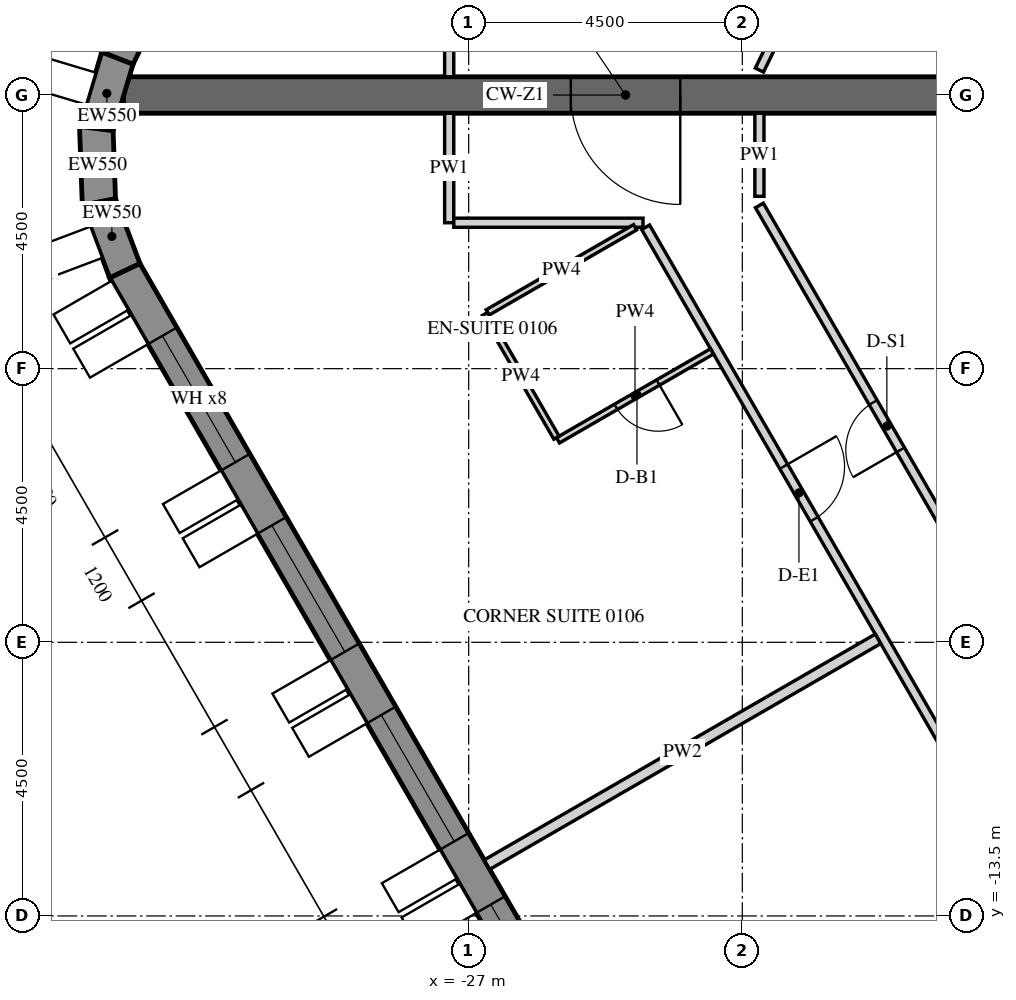
"""IFC4 building model, lengths in metres.
Left out: names, types, materials, properties, quantities, classifications, styles, units other than length and angle.
Written with IfcOpenShell. Run it as: python <this file> out.ifc"""

import sys

from ifc_helpers import new_model, si_unit, direction, frame, frame_2d, origin, place, context, subcontext, project, spatial, polyline, rectangle, outline, extrude, element, fill, save


model = new_model("IFC4")
c1 = context("Model", 3, precision=1e-05, world=origin(), true_north=direction((0.0, 1.0)))
c2 = subcontext(c1, "Body", "Model", "MODEL_VIEW")
j1 = project(units=[si_unit("LENGTHUNIT", "METRE"), si_unit("PLANEANGLEUNIT", "RADIAN")], contexts=[c1])
p1 = place(None, origin())
s1 = spatial("IfcSite", under=j1, at=p1, CompositionType="ELEMENT")
p2 = place(p1, origin())
s2 = spatial("IfcBuilding", under=s1, at=p2, CompositionType="ELEMENT")
p3 = place(p2, frame((0.0, 0.0, 37.5)))
s3 = spatial("IfcBuildingStorey", under=s2, at=p3, CompositionType="ELEMENT", Elevation=37.5)
p4 = place(p3, frame((-19.595, 27.633, -0.15), z_axis=(0.0, 0.0, 1.0), x_axis=(-0.438368285794, -0.898795441694, 0.0)))
e1 = element("IfcWall", 1, at=p4, inside=s3, PredefinedType="SOLIDWALL", context=c2, shape_type="SweptSolid", body=[
    extrude(outline(polyline([(-0.026, -0.275), (30.093, -0.275), (30.048, 0.275), (0.026, 0.275), (-0.026, -0.275)])), origin(), (0.0, 0.0, 1.0), 3.9),
])
p5 = place(p4, frame((1.236, 0.0, 1.05)))
e2 = element("IfcOpeningElement", 2, at=p5, cuts=e1, PredefinedType="OPENING", context=c2, shape_type="SweptSolid", body=[
    extrude(rectangle(XDim=2.4, YDim=2.4, at=frame_2d((1.2, 1.2))), frame((0.0, 0.285, 0.0), z_axis=(0.0, -1.0, 0.0), x_axis=(1.0, 0.0, 0.0)), (0.0, 0.0, 1.0), 0.57),
])
p6 = place(p4, frame((4.835, 0.0, 1.05)))
e3 = element("IfcOpeningElement", 3, at=p6, cuts=e1, PredefinedType="OPENING", context=c2, shape_type="SweptSolid", body=[
    extrude(rectangle(XDim=2.4, YDim=2.4, at=frame_2d((1.2, 1.2))), frame((0.0, 0.285, 0.0), z_axis=(0.0, -1.0, 0.0), x_axis=(1.0, 0.0, 0.0)), (0.0, 0.0, 1.0), 0.57),
])
p7 = place(p4, frame((8.436, 0.0, 1.05)))
e4 = element("IfcOpeningElement", 4, at=p7, cuts=e1, PredefinedType="OPENING", context=c2, shape_type="SweptSolid", body=[
    extrude(rectangle(XDim=2.4, YDim=2.4, at=frame_2d((1.2, 1.2))), frame((0.0, 0.285, 0.0), z_axis=(0.0, -1.0, 0.0), x_axis=(1.0, 0.0, 0.0)), (0.0, 0.0, 1.0), 0.57),
])
p8 = place(p4, frame((12.035, 0.0, 1.05)))
e5 = element("IfcOpeningElement", 5, at=p8, cuts=e1, PredefinedType="OPENING", context=c2, shape_type="SweptSolid", body=[
    extrude(rectangle(XDim=2.4, YDim=2.4, at=frame_2d((1.2, 1.2))), frame((0.0, 0.285, 0.0), z_axis=(0.0, -1.0, 0.0), x_axis=(1.0, 0.0, 0.0)), (0.0, 0.0, 1.0), 0.57),
])
p9 = place(p4, frame((15.635, 0.0, 1.05)))
e6 = element("IfcOpeningElement", 6, at=p9, cuts=e1, PredefinedType="OPENING", context=c2, shape_type="SweptSolid", body=[
    extrude(rectangle(XDim=2.4, YDim=2.4, at=frame_2d((1.2, 1.2))), frame((0.0, 0.285, 0.0), z_axis=(0.0, -1.0, 0.0), x_axis=(1.0, 0.0, 0.0)), (0.0, 0.0, 1.0), 0.57),
])
p10 = place(p4, frame((19.236, 0.0, 1.05)))
e7 = element("IfcOpeningElement", 7, at=p10, cuts=e1, PredefinedType="OPENING", context=c2, shape_type="SweptSolid", body=[
    extrude(rectangle(XDim=2.4, YDim=2.4, at=frame_2d((1.2, 1.2))), frame((0.0, 0.285, 0.0), z_axis=(0.0, -1.0, 0.0), x_axis=(1.0, 0.0, 0.0)), (0.0, 0.0, 1.0), 0.57),
])
p11 = place(p4, frame((22.835, 0.0, 1.05)))
e8 = element("IfcOpeningElement", 8, at=p11, cuts=e1, PredefinedType="OPENING", context=c2, shape_type="SweptSolid", body=[
    extrude(rectangle(XDim=2.4, YDim=2.4, at=frame_2d((1.2, 1.2))), frame((0.0, 0.285, 0.0), z_axis=(0.0, -1.0, 0.0), x_axis=(1.0, 0.0, 0.0)), (0.0, 0.0, 1.0), 0.57),
])
p12 = place(p4, frame((26.436, 0.0, 1.05)))
e9 = element("IfcOpeningElement", 9, at=p12, cuts=e1, PredefinedType="OPENING", context=c2, shape_type="SweptSolid", body=[
    extrude(rectangle(XDim=2.4, YDim=2.4, at=frame_2d((1.2, 1.2))), frame((0.0, 0.285, 0.0), z_axis=(0.0, -1.0, 0.0), x_axis=(1.0, 0.0, 0.0)), (0.0, 0.0, 1.0), 0.57),
])
p13 = place(p3, frame((-32.777, 0.605, -0.15), z_axis=(0.0, 0.0, 1.0), x_axis=(-0.286921497463, -0.957954098219, 0.0)))
e10 = element("IfcWall", 10, at=p13, inside=s3, PredefinedType="SOLIDWALL", context=c2, shape_type="SweptSolid", body=[
    extrude(outline(polyline([(-0.022, -0.275), (1.253, -0.275), (1.163, 0.275), (0.022, 0.275), (-0.022, -0.275)])), origin(), (0.0, 0.0, 1.0), 3.9),
])
p14 = place(p3, frame((-33.124, -0.552, -0.15), z_axis=(0.0, 0.0, 1.0), x_axis=(0.03495638276, -0.999388838893, 0.0)))
e11 = element("IfcWall", 11, at=p14, inside=s3, PredefinedType="SOLIDWALL", context=c2, shape_type="SweptSolid", body=[
    extrude(outline(polyline([(-0.045, -0.275), (1.253, -0.275), (1.163, 0.275), (0.045, 0.275), (-0.045, -0.275)])), origin(), (0.0, 0.0, 1.0), 3.9),
])
p15 = place(p3, frame((-33.081, -1.76, -0.15), z_axis=(0.0, 0.0, 1.0), x_axis=(0.353027214741, -0.935613053378, 0.0)))
e12 = element("IfcWall", 12, at=p15, inside=s3, PredefinedType="SOLIDWALL", context=c2, shape_type="SweptSolid", body=[
    extrude(outline(polyline([(-0.045, -0.275), (1.231, -0.275), (1.186, 0.275), (0.045, 0.275), (-0.045, -0.275)])), origin(), (0.0, 0.0, 1.0), 3.9),
])
p16 = place(p3, frame((-32.655, -2.89, -0.15), z_axis=(0.0, 0.0, 1.0), x_axis=(0.499997711317, -0.866026725152, 0.0)))
e13 = element("IfcWall", 13, at=p16, inside=s3, PredefinedType="SOLIDWALL", context=c2, shape_type="SweptSolid", body=[
    extrude(outline(polyline([(-0.022, -0.275), (30.097, -0.275), (30.045, 0.275), (0.022, 0.275), (-0.022, -0.275)])), origin(), (0.0, 0.0, 1.0), 3.9),
])
p17 = place(p16, frame((1.236, 0.0, 1.05)))
e14 = element("IfcOpeningElement", 14, at=p17, cuts=e13, PredefinedType="OPENING", context=c2, shape_type="SweptSolid", body=[
    extrude(rectangle(XDim=2.4, YDim=2.4, at=frame_2d((1.2, 1.2))), frame((0.0, 0.285, 0.0), z_axis=(0.0, -1.0, 0.0), x_axis=(1.0, 0.0, 0.0)), (0.0, 0.0, 1.0), 0.57),
])
p18 = place(p16, frame((4.835, 0.0, 1.05)))
e15 = element("IfcOpeningElement", 15, at=p18, cuts=e13, PredefinedType="OPENING", context=c2, shape_type="SweptSolid", body=[
    extrude(rectangle(XDim=2.4, YDim=2.4, at=frame_2d((1.2, 1.2))), frame((0.0, 0.285, 0.0), z_axis=(0.0, -1.0, 0.0), x_axis=(1.0, 0.0, 0.0)), (0.0, 0.0, 1.0), 0.57),
])
p19 = place(p16, frame((8.436, 0.0, 1.05)))
e16 = element("IfcOpeningElement", 16, at=p19, cuts=e13, PredefinedType="OPENING", context=c2, shape_type="SweptSolid", body=[
    extrude(rectangle(XDim=2.4, YDim=2.4, at=frame_2d((1.2, 1.2))), frame((0.0, 0.285, 0.0), z_axis=(0.0, -1.0, 0.0), x_axis=(1.0, 0.0, 0.0)), (0.0, 0.0, 1.0), 0.57),
])
p20 = place(p16, frame((12.035, 0.0, 1.05)))
e17 = element("IfcOpeningElement", 17, at=p20, cuts=e13, PredefinedType="OPENING", context=c2, shape_type="SweptSolid", body=[
    extrude(rectangle(XDim=2.4, YDim=2.4, at=frame_2d((1.2, 1.2))), frame((0.0, 0.285, 0.0), z_axis=(0.0, -1.0, 0.0), x_axis=(1.0, 0.0, 0.0)), (0.0, 0.0, 1.0), 0.57),
])
p21 = place(p16, frame((15.635, 0.0, 1.05)))
e18 = element("IfcOpeningElement", 18, at=p21, cuts=e13, PredefinedType="OPENING", context=c2, shape_type="SweptSolid", body=[
    extrude(rectangle(XDim=2.4, YDim=2.4, at=frame_2d((1.2, 1.2))), frame((0.0, 0.285, 0.0), z_axis=(0.0, -1.0, 0.0), x_axis=(1.0, 0.0, 0.0)), (0.0, 0.0, 1.0), 0.57),
])
p22 = place(p16, frame((19.236, 0.0, 1.05)))
e19 = element("IfcOpeningElement", 19, at=p22, cuts=e13, PredefinedType="OPENING", context=c2, shape_type="SweptSolid", body=[
    extrude(rectangle(XDim=2.4, YDim=2.4, at=frame_2d((1.2, 1.2))), frame((0.0, 0.285, 0.0), z_axis=(0.0, -1.0, 0.0), x_axis=(1.0, 0.0, 0.0)), (0.0, 0.0, 1.0), 0.57),
])
p23 = place(p16, frame((22.835, 0.0, 1.05)))
e20 = element("IfcOpeningElement", 20, at=p23, cuts=e13, PredefinedType="OPENING", context=c2, shape_type="SweptSolid", body=[
    extrude(rectangle(XDim=2.4, YDim=2.4, at=frame_2d((1.2, 1.2))), frame((0.0, 0.285, 0.0), z_axis=(0.0, -1.0, 0.0), x_axis=(1.0, 0.0, 0.0)), (0.0, 0.0, 1.0), 0.57),
])
p24 = place(p16, frame((26.436, 0.0, 1.05)))
e21 = element("IfcOpeningElement", 21, at=p24, cuts=e13, PredefinedType="OPENING", context=c2, shape_type="SweptSolid", body=[
    extrude(rectangle(XDim=2.4, YDim=2.4, at=frame_2d((1.2, 1.2))), frame((0.0, 0.285, 0.0), z_axis=(0.0, -1.0, 0.0), x_axis=(1.0, 0.0, 0.0)), (0.0, 0.0, 1.0), 0.57),
])
p25 = place(p3, frame((-16.166, 0.0, -0.15), z_axis=(0.0, 0.0, 1.0), x_axis=(-1.0, 0.0, 0.0)))
e22 = element("IfcWall", 22, at=p25, inside=s3, PredefinedType="SHEAR", context=c2, shape_type="SweptSolid", body=[
    extrude(rectangle(XDim=16.509, YDim=0.6, at=frame_2d((8.254, 0.0))), origin(), (0.0, 0.0, 1.0), 3.9),
])
p26 = place(p25, frame((7.354, 0.0, 0.15)))
e23 = element("IfcOpeningElement", 23, at=p26, cuts=e22, PredefinedType="OPENING", context=c2, shape_type="SweptSolid", body=[
    extrude(rectangle(XDim=1.8, YDim=2.4, at=frame_2d((0.9, 1.2))), frame((0.0, 0.31, 0.0), z_axis=(0.0, -1.0, 0.0), x_axis=(1.0, 0.0, 0.0)), (0.0, 0.0, 1.0), 0.62),
])
p27 = place(p3, frame((-27.32, 2.025, 0.0), z_axis=(0.0, 0.0, 1.0), x_axis=(0.0, -1.0, 0.0)))
e24 = element("IfcWall", 24, at=p27, inside=s3, PredefinedType="PARTITIONING", context=c2, shape_type="SweptSolid", body=[
    extrude(rectangle(XDim=1.725, YDim=0.15, at=frame_2d((0.862, 0.0))), origin(), (0.0, 0.0, 1.0), 2.988),
])
p28 = place(p3, frame((-22.219, 0.41, 0.0), z_axis=(0.0, 0.0, 1.0), x_axis=(0.438391891827, 0.898783927972, 0.0)))
e25 = element("IfcWall", 25, at=p28, inside=s3, PredefinedType="PARTITIONING", context=c2, shape_type="SweptSolid", body=[
    extrude(rectangle(XDim=9.699, YDim=0.15, at=frame_2d((4.85, 0.0))), origin(), (0.0, 0.0, 1.0), 2.988),
])
p29 = place(p28, frame((4.4, 0.0, 0.0)))
e26 = element("IfcOpeningElement", 26, at=p29, cuts=e25, PredefinedType="OPENING", context=c2, shape_type="SweptSolid", body=[
    extrude(rectangle(XDim=0.9, YDim=2.1, at=frame_2d((0.45, 1.05))), frame((0.0, 0.085, 0.0), z_axis=(0.0, -1.0, 0.0), x_axis=(1.0, 0.0, 0.0)), (0.0, 0.0, 1.0), 0.17),
])
p30 = place(p3, frame((-27.32, -0.3, 0.0), z_axis=(0.0, 0.0, 1.0), x_axis=(0.0, -1.0, 0.0)))
e27 = element("IfcWall", 27, at=p30, inside=s3, PredefinedType="PARTITIONING", context=c2, shape_type="SweptSolid", body=[
    extrude(rectangle(XDim=1.8, YDim=0.15, at=frame_2d((0.9, 0.0))), origin(), (0.0, 0.0, 1.0), 2.988),
])
p31 = place(p3, frame((-27.245, -2.1, 0.0), z_axis=(0.0, 0.0, 1.0), x_axis=(1.0, 0.0, 0.0)))
e28 = element("IfcWall", 28, at=p31, inside=s3, PredefinedType="PARTITIONING", context=c2, shape_type="SweptSolid", body=[
    extrude(rectangle(XDim=3.112, YDim=0.15, at=frame_2d((1.556, 0.0))), origin(), (0.0, 0.0, 1.0), 2.988),
])
p32 = place(p3, frame((-24.09, -2.175, 0.0), z_axis=(0.0, 0.0, 1.0), x_axis=(0.499996832073, -0.86602723278, 0.0)))
e29 = element("IfcWall", 29, at=p32, inside=s3, PredefinedType="PARTITIONING", context=c2, shape_type="SweptSolid", body=[
    extrude(rectangle(XDim=23.877, YDim=0.15, at=frame_2d((11.938, 0.0))), origin(), (0.0, 0.0, 1.0), 2.988),
])
p33 = place(p32, frame((4.543, 0.0, 0.0)))
e30 = element("IfcOpeningElement", 30, at=p33, cuts=e29, PredefinedType="OPENING", context=c2, shape_type="SweptSolid", body=[
    extrude(rectangle(XDim=1.0, YDim=2.1, at=frame_2d((0.5, 1.05))), frame((0.0, 0.085, 0.0), z_axis=(0.0, -1.0, 0.0), x_axis=(1.0, 0.0, 0.0)), (0.0, 0.0, 1.0), 0.17),
])
p34 = place(p32, frame((11.372, 0.0, 0.0)))
e31 = element("IfcOpeningElement", 31, at=p34, cuts=e29, PredefinedType="OPENING", context=c2, shape_type="SweptSolid", body=[
    extrude(rectangle(XDim=1.0, YDim=2.1, at=frame_2d((0.5, 1.05))), frame((0.0, 0.085, 0.0), z_axis=(0.0, -1.0, 0.0), x_axis=(1.0, 0.0, 0.0)), (0.0, 0.0, 1.0), 0.17),
])
p35 = place(p32, frame((19.425, 0.0, 0.0)))
e32 = element("IfcOpeningElement", 32, at=p35, cuts=e29, PredefinedType="OPENING", context=c2, shape_type="SweptSolid", body=[
    extrude(rectangle(XDim=1.0, YDim=2.1, at=frame_2d((0.5, 1.05))), frame((0.0, 0.085, 0.0), z_axis=(0.0, -1.0, 0.0), x_axis=(1.0, 0.0, 0.0)), (0.0, 0.0, 1.0), 0.17),
])
p36 = place(p3, frame((-18.027, -9.076, 0.0), z_axis=(0.0, 0.0, 1.0), x_axis=(-0.500007318041, 0.86602117867, 0.0)))
e33 = element("IfcWall", 33, at=p36, inside=s3, PredefinedType="PARTITIONING", context=c2, shape_type="SweptSolid", body=[
    extrude(rectangle(XDim=8.383, YDim=0.15, at=frame_2d((4.191, 0.0))), origin(), (0.0, 0.0, 1.0), 2.988),
])
p37 = place(p36, frame((3.742, 0.0, 0.0)))
e34 = element("IfcOpeningElement", 34, at=p37, cuts=e33, PredefinedType="OPENING", context=c2, shape_type="SweptSolid", body=[
    extrude(rectangle(XDim=0.9, YDim=2.1, at=frame_2d((0.45, 1.05))), frame((0.0, 0.085, 0.0), z_axis=(0.0, -1.0, 0.0), x_axis=(1.0, 0.0, 0.0)), (0.0, 0.0, 1.0), 0.17),
])
p38 = place(p3, frame((-22.219, -1.666, 0.0), z_axis=(0.0, 0.0, 1.0), x_axis=(0.0, 1.0, 0.0)))
e35 = element("IfcWall", 35, at=p38, inside=s3, PredefinedType="PARTITIONING", context=c2, shape_type="SweptSolid", body=[
    extrude(rectangle(XDim=1.366, YDim=0.15, at=frame_2d((0.683, 0.0))), origin(), (0.0, 0.0, 1.0), 2.988),
])
p39 = place(p3, frame((-22.998, -4.216, 0.0), z_axis=(0.0, 0.0, 1.0), x_axis=(-0.866025730634, -0.499999433879, 0.0)))
e36 = element("IfcWall", 36, at=p39, inside=s3, PredefinedType="PARTITIONING", context=c2, shape_type="SweptSolid", body=[
    extrude(rectangle(XDim=2.925, YDim=0.1, at=frame_2d((1.462, 0.0))), origin(), (0.0, 0.0, 1.0), 2.988),
])
p40 = place(p39, frame((1.025, 0.0, 0.0)))
e37 = element("IfcOpeningElement", 37, at=p40, cuts=e36, PredefinedType="OPENING", context=c2, shape_type="SweptSolid", body=[
    extrude(rectangle(XDim=0.8, YDim=2.1, at=frame_2d((0.4, 1.05))), frame((0.0, 0.06, 0.0), z_axis=(0.0, -1.0, 0.0), x_axis=(1.0, 0.0, 0.0)), (0.0, 0.0, 1.0), 0.12),
])
p41 = place(p3, frame((-25.556, -5.635, 0.0), z_axis=(0.0, 0.0, 1.0), x_axis=(-0.499938297808, 0.866061024631, 0.0)))
e38 = element("IfcWall", 38, at=p41, inside=s3, PredefinedType="PARTITIONING", context=c2, shape_type="SweptSolid", body=[
    extrude(rectangle(XDim=2.35, YDim=0.1, at=frame_2d((1.175, 0.0))), origin(), (0.0, 0.0, 1.0), 2.988),
])
p42 = place(p3, frame((-26.688, -3.575, 0.0), z_axis=(0.0, 0.0, 1.0), x_axis=(0.866034573852, 0.49998411664, 0.0)))
e39 = element("IfcWall", 39, at=p42, inside=s3, PredefinedType="PARTITIONING", context=c2, shape_type="SweptSolid", body=[
    extrude(rectangle(XDim=2.8, YDim=0.1, at=frame_2d((1.4, 0.0))), origin(), (0.0, 0.0, 1.0), 2.988),
])
p43 = place(p3, frame((-26.699, -12.656, 0.0), z_axis=(0.0, 0.0, 1.0), x_axis=(0.866028983062, 0.499993800457, 0.0)))
e40 = element("IfcWall", 40, at=p43, inside=s3, PredefinedType="PARTITIONING", context=c2, shape_type="SweptSolid", body=[
    extrude(rectangle(XDim=7.425, YDim=0.18, at=frame_2d((3.712, 0.0))), origin(), (0.0, 0.0, 1.0), 2.988),
])
p44 = place(p17, frame((0.0, 0.205, 0.0)))
e41 = element("IfcWindow", 41, at=p44, inside=s3, PartitioningType="DOUBLE_PANEL_VERTICAL", PredefinedType="WINDOW", context=c2, shape_type="SweptSolid", body=[
    extrude(rectangle(XDim=2.4, YDim=2.4, at=frame_2d((1.2, 1.2))), frame((0.0, 0.03, 0.0), z_axis=(0.0, -1.0, 0.0), x_axis=(1.0, 0.0, 0.0)), (0.0, 0.0, 1.0), 0.06),
])
fill(e14, e41)
p45 = place(p18, frame((0.0, 0.205, 0.0)))
e42 = element("IfcWindow", 42, at=p45, inside=s3, PartitioningType="DOUBLE_PANEL_VERTICAL", PredefinedType="WINDOW", context=c2, shape_type="SweptSolid", body=[
    extrude(rectangle(XDim=2.4, YDim=2.4, at=frame_2d((1.2, 1.2))), frame((0.0, 0.03, 0.0), z_axis=(0.0, -1.0, 0.0), x_axis=(1.0, 0.0, 0.0)), (0.0, 0.0, 1.0), 0.06),
])
fill(e15, e42)
p46 = place(p19, frame((0.0, 0.205, 0.0)))
e43 = element("IfcWindow", 43, at=p46, inside=s3, PartitioningType="DOUBLE_PANEL_VERTICAL", PredefinedType="WINDOW", context=c2, shape_type="SweptSolid", body=[
    extrude(rectangle(XDim=2.4, YDim=2.4, at=frame_2d((1.2, 1.2))), frame((0.0, 0.03, 0.0), z_axis=(0.0, -1.0, 0.0), x_axis=(1.0, 0.0, 0.0)), (0.0, 0.0, 1.0), 0.06),
])
fill(e16, e43)
p47 = place(p20, frame((0.0, 0.205, 0.0)))
e44 = element("IfcWindow", 44, at=p47, inside=s3, PartitioningType="DOUBLE_PANEL_VERTICAL", PredefinedType="WINDOW", context=c2, shape_type="SweptSolid", body=[
    extrude(rectangle(XDim=2.4, YDim=2.4, at=frame_2d((1.2, 1.2))), frame((0.0, 0.03, 0.0), z_axis=(0.0, -1.0, 0.0), x_axis=(1.0, 0.0, 0.0)), (0.0, 0.0, 1.0), 0.06),
])
fill(e17, e44)
p48 = place(p26, origin())
e45 = element("IfcDoor", 45, at=p48, inside=s3, OperationType="DOUBLE_DOOR_SINGLE_SWING", PredefinedType="DOOR", context=c2, shape_type="SweptSolid", body=[
    extrude(rectangle(XDim=1.8, YDim=2.4, at=frame_2d((0.9, 1.2))), frame((0.0, 0.025, 0.0), z_axis=(0.0, -1.0, 0.0), x_axis=(1.0, 0.0, 0.0)), (0.0, 0.0, 1.0), 0.05),
])
fill(e23, e45)
p49 = place(p33, origin())
e46 = element("IfcDoor", 46, at=p49, inside=s3, OperationType="SINGLE_SWING_RIGHT", PredefinedType="DOOR", context=c2, shape_type="SweptSolid", body=[
    extrude(rectangle(XDim=1.0, YDim=2.1, at=frame_2d((0.5, 1.05))), frame((0.0, 0.025, 0.0), z_axis=(0.0, -1.0, 0.0), x_axis=(1.0, 0.0, 0.0)), (0.0, 0.0, 1.0), 0.05),
])
fill(e30, e46)
p50 = place(p40, origin())
e47 = element("IfcDoor", 47, at=p50, inside=s3, OperationType="SINGLE_SWING_RIGHT", PredefinedType="DOOR", context=c2, shape_type="SweptSolid", body=[
    extrude(rectangle(XDim=0.8, YDim=2.1, at=frame_2d((0.4, 1.05))), frame((0.0, 0.025, 0.0), z_axis=(0.0, -1.0, 0.0), x_axis=(1.0, 0.0, 0.0)), (0.0, 0.0, 1.0), 0.05),
])
fill(e37, e47)
p51 = place(p37, origin())
e48 = element("IfcDoor", 48, at=p51, inside=s3, OperationType="SINGLE_SWING_RIGHT", PredefinedType="DOOR", context=c2, shape_type="SweptSolid", body=[
    extrude(rectangle(XDim=0.9, YDim=2.1, at=frame_2d((0.45, 1.05))), frame((0.0, 0.025, 0.0), z_axis=(0.0, -1.0, 0.0), x_axis=(1.0, 0.0, 0.0)), (0.0, 0.0, 1.0), 0.05),
])
fill(e34, e48)
save(model, sys.argv[1])
